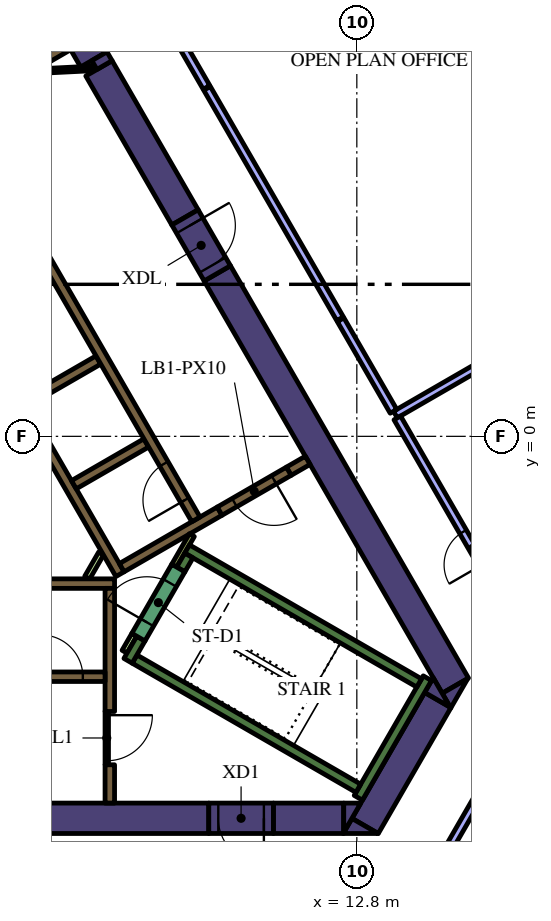
"""IFC4 building model, lengths in metres.
Left out: names, types, materials, properties, quantities, classifications, styles, units other than length and angle.
Written with IfcOpenShell. Run it as: python <this file> out.ifc"""

import sys

from ifc_helpers import new_model, si_unit, direction, frame, frame_2d, origin, place, context, subcontext, project, spatial, polyline, rectangle, outline, extrude, element, fill, save


model = new_model("IFC4")
c1 = context("Model", 3, precision=1e-05, world=origin(), true_north=direction((0.0, 1.0)))
c2 = subcontext(c1, "Body", "Model", "MODEL_VIEW")
j1 = project(units=[si_unit("LENGTHUNIT", "METRE"), si_unit("PLANEANGLEUNIT", "RADIAN")], contexts=[c1])
p1 = place(None, origin())
s1 = spatial("IfcSite", under=j1, at=p1, CompositionType="ELEMENT")
p2 = place(p1, origin())
s2 = spatial("IfcBuilding", under=s1, at=p2, CompositionType="ELEMENT")
p3 = place(p2, frame((0.0, 0.0, 183.6)))
s3 = spatial("IfcBuildingStorey", under=s2, at=p3, CompositionType="ELEMENT", Elevation=183.6)
p4 = place(p3, frame((9.129, 4.289, 0.0), z_axis=(0.0, 0.0, 1.0), x_axis=(0.499995742806, -0.866027861663, 0.0)))
e1 = element("IfcWall", 1, at=p4, inside=s3, PredefinedType="SOLIDWALL", context=c2, shape_type="SweptSolid", body=[
    extrude(rectangle(XDim=12.527, YDim=0.8, at=frame_2d((6.264, 0.0))), origin(), (0.0, 0.0, 1.0), 4.2),
])
p5 = place(p3, origin())
e2 = element("IfcWall", 2, at=p5, inside=s3, PredefinedType="SOLIDWALL", context=c2, shape_type="SweptSolid", body=[
    extrude(outline(polyline([(15.271, -7.15), (15.047, -6.762), (15.719, -6.374), (15.271, -7.15)])), origin(), (0.0, 0.0, 1.0), 4.2),
])
p6 = place(p3, frame((13.018, -10.252, 0.0), z_axis=(0.0, 0.0, 1.0), x_axis=(0.499984020225, 0.866034629516, 0.0)))
e3 = element("IfcWall", 3, at=p6, inside=s3, PredefinedType="SOLIDWALL", context=c2, shape_type="SweptSolid", body=[
    extrude(rectangle(XDim=3.824, YDim=0.8, at=frame_2d((1.912, 0.0))), origin(), (0.0, 0.0, 1.0), 4.2),
])
e4 = element("IfcWall", 4, at=p5, inside=s3, PredefinedType="SOLIDWALL", context=c2, shape_type="SweptSolid", body=[
    extrude(outline(polyline([(12.671, -10.053), (13.358, -10.45), (12.442, -10.45), (12.671, -10.053)])), origin(), (0.0, 0.0, 1.0), 4.2),
])
e5 = element("IfcWall", 5, at=p5, inside=s3, PredefinedType="SOLIDWALL", context=c2, shape_type="SweptSolid", body=[
    extrude(outline(polyline([(14.809, -6.35), (15.257, -7.126), (14.585, -6.738), (14.809, -6.35)])), origin(), (0.0, 0.0, 1.0), 4.2),
])
p7 = place(p3, frame((10.604, -10.05, 0.0), z_axis=(0.0, 0.0, 1.0), x_axis=(1.0, 0.0, 0.0)))
e6 = element("IfcWall", 6, at=p7, inside=s3, PredefinedType="SOLIDWALL", context=c2, shape_type="SweptSolid", body=[
    extrude(rectangle(XDim=1.849, YDim=0.8, at=frame_2d((0.925, 0.0))), origin(), (0.0, 0.0, 1.0), 4.2),
])
e7 = element("IfcWall", 7, at=p5, inside=s3, PredefinedType="SOLIDWALL", context=c2, shape_type="SweptSolid", body=[
    extrude(outline(polyline([(12.904, -9.65), (12.456, -10.426), (12.456, -9.65), (12.904, -9.65)])), origin(), (0.0, 0.0, 1.0), 4.2),
])
p8 = place(p3, frame((5.878, 9.918, 0.0), z_axis=(0.0, 0.0, 1.0), x_axis=(-0.499893918903, 0.866086641072, 0.0)))
e8 = element("IfcWall", 8, at=p8, inside=s3, PredefinedType="SOLIDWALL", context=c2, shape_type="SweptSolid", body=[
    extrude(rectangle(XDim=0.657, YDim=0.8, at=frame_2d((0.329, 0.0))), origin(), (0.0, 0.0, 1.0), 4.2),
])
p9 = place(p3, frame((8.279, 5.761, 0.0), z_axis=(0.0, 0.0, 1.0), x_axis=(-0.500024261398, 0.866011396007, 0.0)))
e9 = element("IfcWall", 9, at=p9, inside=s3, PredefinedType="SOLIDWALL", context=c2, shape_type="SweptSolid", body=[
    extrude(rectangle(XDim=4.528, YDim=0.8, at=frame_2d((2.264, 0.0))), origin(), (0.0, 0.0, 1.0), 4.2),
])
e10 = element("IfcWall", 10, at=p5, inside=s3, PredefinedType="SOLIDWALL", context=c2, shape_type="SweptSolid", body=[
    extrude(outline(polyline([(5.961, 9.654), (5.827, 9.886), (6.226, 10.116), (6.36, 9.884), (5.961, 9.654)])), origin(), (0.0, 0.0, 1.0), 4.2),
])
p10 = place(p3, frame((-13.378, -10.05, 0.0), z_axis=(0.0, 0.0, 1.0), x_axis=(1.0, 0.0, 0.0)))
e11 = element("IfcWall", 11, at=p10, inside=s3, PredefinedType="SOLIDWALL", context=c2, shape_type="SweptSolid", body=[
    extrude(rectangle(XDim=22.282, YDim=0.8, at=frame_2d((11.141, 0.0))), origin(), (0.0, 0.0, 1.0), 4.2),
])
p11 = place(p3, frame((12.84, -9.511, 0.0), z_axis=(0.0, 0.0, 1.0), x_axis=(0.499997733992, 0.866026712061, 0.0)))
e12 = element("IfcWall", 12, at=p11, inside=s3, PredefinedType="SOLIDWALL", context=c2, shape_type="SweptSolid", body=[
    extrude(rectangle(XDim=3.634, YDim=0.25, at=frame_2d((1.817, 0.0))), origin(), (0.0, 0.0, 1.0), 4.2),
])
p12 = place(p3, frame((12.84, -9.261, 0.0), z_axis=(0.0, 0.0, 1.0), x_axis=(-0.866013990052, 0.500019768644, 0.0)))
e13 = element("IfcWall", 13, at=p12, inside=s3, PredefinedType="SOLIDWALL", context=c2, shape_type="SweptSolid", body=[
    extrude(rectangle(XDim=6.8, YDim=0.25, at=frame_2d((3.4, 0.0))), origin(), (0.0, 0.0, 1.0), 4.2),
])
p13 = place(p3, frame((6.78, -5.906, 0.0), z_axis=(0.0, 0.0, 1.0), x_axis=(0.500223362819, 0.865896406789, 0.0)))
e14 = element("IfcWall", 14, at=p13, inside=s3, PredefinedType="SOLIDWALL", context=c2, shape_type="SweptSolid", body=[
    extrude(rectangle(XDim=0.675, YDim=0.25, at=frame_2d((0.337, 0.0))), origin(), (0.0, 0.0, 1.0), 4.2),
])
p14 = place(p3, frame((8.334, -2.964, 0.0), z_axis=(0.0, 0.0, 1.0), x_axis=(0.866016039709, -0.500016218704, 0.0)))
e15 = element("IfcWall", 15, at=p14, inside=s3, PredefinedType="SOLIDWALL", context=c2, shape_type="SweptSolid", body=[
    extrude(rectangle(XDim=7.05, YDim=0.25, at=frame_2d((3.525, 0.0))), origin(), (0.0, 0.0, 1.0), 4.2),
])
p15 = place(p3, frame((8.168, -3.503, 0.0), z_axis=(0.0, 0.0, 1.0), x_axis=(0.49972245349, 0.866185586049, 0.0)))
e16 = element("IfcWall", 16, at=p15, inside=s3, PredefinedType="SOLIDWALL", context=c2, shape_type="SweptSolid", body=[
    extrude(rectangle(XDim=0.425, YDim=0.25, at=frame_2d((0.212, 0.0))), origin(), (0.0, 0.0, 1.0), 4.2),
])
p16 = place(p3, frame((-5.545, -3.875, 0.0), z_axis=(0.0, 0.0, 1.0), x_axis=(1.0, 0.0, 0.0)))
e17 = element("IfcWall", 17, at=p16, inside=s3, PredefinedType="SOLIDWALL", context=c2, shape_type="SweptSolid", body=[
    extrude(rectangle(XDim=11.97, YDim=0.25, at=frame_2d((5.985, 0.0))), origin(), (0.0, 0.0, 1.0), 4.2),
])
p17 = place(p3, frame((6.3, -7.24, 0.0), z_axis=(0.0, 0.0, 1.0), x_axis=(0.0, 1.0, 0.0)))
e18 = element("IfcWall", 18, at=p17, inside=s3, PredefinedType="SOLIDWALL", context=c2, shape_type="SweptSolid", body=[
    extrude(rectangle(XDim=3.24, YDim=0.25, at=frame_2d((1.62, 0.0))), origin(), (0.0, 0.0, 1.0), 4.2),
])
p18 = place(p3, frame((6.3, -9.65, 0.0), z_axis=(0.0, 0.0, 1.0), x_axis=(0.0, 1.0, 0.0)))
e19 = element("IfcWall", 19, at=p18, inside=s3, PredefinedType="SOLIDWALL", context=c2, shape_type="SweptSolid", body=[
    extrude(rectangle(XDim=1.008, YDim=0.25, at=frame_2d((0.504, 0.0))), origin(), (0.0, 0.0, 1.0), 4.2),
])
p19 = place(p3, frame((11.507, -0.631, 0.0), z_axis=(0.0, 0.0, 1.0), x_axis=(-0.866093731455, -0.499881634324, 0.0)))
e20 = element("IfcWall", 20, at=p19, inside=s3, PredefinedType="SOLIDWALL", context=c2, shape_type="SweptSolid", body=[
    extrude(rectangle(XDim=0.575, YDim=0.25, at=frame_2d((0.288, 0.0))), origin(), (0.0, 0.0, 1.0), 4.2),
])
p20 = place(p3, frame((6.568, -3.627, 0.0), z_axis=(0.0, 0.0, 1.0), x_axis=(-0.499999455981, 0.866025717874, 0.0)))
e21 = element("IfcWall", 21, at=p20, inside=s3, PredefinedType="SOLIDWALL", context=c2, shape_type="SweptSolid", body=[
    extrude(rectangle(XDim=11.978, YDim=0.25, at=frame_2d((5.989, 0.0))), origin(), (0.0, 0.0, 1.0), 4.2),
])
for number, where, z_axis, x_axis in (
    (22, (2.834, 3.091, 0.0), (0.0, 0.0, 1.0), (0.866, 0.5, 0.0)),
    (23, (4.094, 0.909, 0.0), (0.0, 0.0, 1.0), (0.866, 0.5, 0.0)),
    (24, (5.354, -1.274, 0.0), (0.0, 0.0, 1.0), (0.866, 0.5, 0.0)),
):
    element("IfcWall", number, at=place(p3, frame(where, z_axis=z_axis, x_axis=x_axis)), inside=s3, PredefinedType="SOLIDWALL", context=c2, shape_type="SweptSolid", body=[
        extrude(rectangle(XDim=2.2, YDim=0.25, at=frame_2d((1.1, 0.0))), origin(), (0.0, 0.0, 1.0), 4.2),
    ])
p21 = place(p3, frame((6.614, -3.456, 0.0), z_axis=(0.0, 0.0, 1.0), x_axis=(0.866032512851, 0.499987686533, 0.0)))
e25 = element("IfcWall", 25, at=p21, inside=s3, PredefinedType="SOLIDWALL", context=c2, shape_type="SweptSolid", body=[
    extrude(rectangle(XDim=2.975, YDim=0.25, at=frame_2d((1.487, 0.0))), origin(), (0.0, 0.0, 1.0), 4.2),
])
p22 = place(p3, frame((4.689, 9.982, 0.0), z_axis=(0.0, 0.0, 1.0), x_axis=(0.865947592822, 0.500134748329, 0.0)))
e26 = element("IfcWall", 26, at=p22, inside=s3, PredefinedType="SOLIDWALL", context=c2, shape_type="SweptSolid", body=[
    extrude(rectangle(XDim=0.598, YDim=0.25, at=frame_2d((0.299, 0.0))), origin(), (0.0, 0.0, 1.0), 4.2),
])
p23 = place(p3, frame((6.945, -5.222, 0.0), z_axis=(0.0, 0.0, 1.0), x_axis=(-0.499818422106, -0.866130212453, 0.0)))
e27 = element("IfcWall", 27, at=p23, inside=s3, PredefinedType="PARTITIONING", context=c2, shape_type="SweptSolid", body=[
    extrude(rectangle(XDim=0.514, YDim=0.15, at=frame_2d((0.257, 0.0))), origin(), (0.0, 0.0, 1.0), 3.15),
])
p24 = place(p3, frame((8.459, -2.599, 0.0), z_axis=(0.0, 0.0, 1.0), x_axis=(-0.500041054325, -0.866001699761, 0.0)))
e28 = element("IfcWall", 28, at=p24, inside=s3, PredefinedType="PARTITIONING", context=c2, shape_type="SweptSolid", body=[
    extrude(rectangle(XDim=0.929, YDim=0.15, at=frame_2d((0.464, 0.0))), origin(), (0.0, 0.0, 1.0), 4.2),
])
p25 = place(p3, frame((5.705, -3.718, 0.0), z_axis=(0.0, 0.0, 1.0), x_axis=(0.499962090823, 0.866047289552, 0.0)))
e29 = element("IfcWall", 29, at=p25, inside=s3, PredefinedType="PARTITIONING", context=c2, shape_type="SweptSolid", body=[
    extrude(rectangle(XDim=0.735, YDim=0.15, at=frame_2d((0.367, 0.0))), origin(), (0.0, 0.0, 1.0), 3.15),
])
p26 = place(p3, frame((-6.175, -6.325, 0.0), z_axis=(0.0, 0.0, 1.0), x_axis=(1.0, 0.0, 0.0)))
e30 = element("IfcWall", 30, at=p26, inside=s3, PredefinedType="SOLIDWALL", context=c2, shape_type="SweptSolid", body=[
    extrude(rectangle(XDim=12.35, YDim=0.25, at=frame_2d((6.175, 0.0))), origin(), (0.0, 0.0, 1.0), 4.2),
])
p27 = place(p26, frame((0.585, 0.0, 0.0)))
e31 = element("IfcOpeningElement", 31, at=p27, cuts=e30, PredefinedType="OPENING", context=c2, shape_type="SweptSolid", body=[
    extrude(rectangle(XDim=1.1, YDim=2.1, at=frame_2d((0.55, 1.05))), frame((0.0, 0.135, 0.0), z_axis=(0.0, -1.0, 0.0), x_axis=(1.0, 0.0, 0.0)), (0.0, 0.0, 1.0), 0.27),
])
p28 = place(p26, frame((3.105, 0.0, 0.0)))
e32 = element("IfcOpeningElement", 32, at=p28, cuts=e30, PredefinedType="OPENING", context=c2, shape_type="SweptSolid", body=[
    extrude(rectangle(XDim=1.1, YDim=2.1, at=frame_2d((0.55, 1.05))), frame((0.0, 0.135, 0.0), z_axis=(0.0, -1.0, 0.0), x_axis=(1.0, 0.0, 0.0)), (0.0, 0.0, 1.0), 0.27),
])
p29 = place(p26, frame((5.625, 0.0, 0.0)))
e33 = element("IfcOpeningElement", 33, at=p29, cuts=e30, PredefinedType="OPENING", context=c2, shape_type="SweptSolid", body=[
    extrude(rectangle(XDim=1.1, YDim=2.1, at=frame_2d((0.55, 1.05))), frame((0.0, 0.135, 0.0), z_axis=(0.0, -1.0, 0.0), x_axis=(1.0, 0.0, 0.0)), (0.0, 0.0, 1.0), 0.27),
])
p30 = place(p26, frame((8.145, 0.0, 0.0)))
e34 = element("IfcOpeningElement", 34, at=p30, cuts=e30, PredefinedType="OPENING", context=c2, shape_type="SweptSolid", body=[
    extrude(rectangle(XDim=1.1, YDim=2.1, at=frame_2d((0.55, 1.05))), frame((0.0, 0.135, 0.0), z_axis=(0.0, -1.0, 0.0), x_axis=(1.0, 0.0, 0.0)), (0.0, 0.0, 1.0), 0.27),
])
p31 = place(p26, frame((10.665, 0.0, 0.0)))
e35 = element("IfcOpeningElement", 35, at=p31, cuts=e30, PredefinedType="OPENING", context=c2, shape_type="SweptSolid", body=[
    extrude(rectangle(XDim=1.1, YDim=2.1, at=frame_2d((0.55, 1.05))), frame((0.0, 0.135, 0.0), z_axis=(0.0, -1.0, 0.0), x_axis=(1.0, 0.0, 0.0)), (0.0, 0.0, 1.0), 0.27),
])
p32 = place(p3, frame((8.565, -2.185, 0.0), z_axis=(0.0, 0.0, 1.0), x_axis=(-0.499997954832, 0.866026584559, 0.0)))
e36 = element("IfcWall", 36, at=p32, inside=s3, PredefinedType="SOLIDWALL", context=c2, shape_type="SweptSolid", body=[
    extrude(rectangle(XDim=12.35, YDim=0.25, at=frame_2d((6.175, 0.0))), origin(), (0.0, 0.0, 1.0), 4.2),
])
p33 = place(p32, frame((0.585, 0.0, 0.0)))
e37 = element("IfcOpeningElement", 37, at=p33, cuts=e36, PredefinedType="OPENING", context=c2, shape_type="SweptSolid", body=[
    extrude(rectangle(XDim=1.1, YDim=2.1, at=frame_2d((0.55, 1.05))), frame((0.0, 0.135, 0.0), z_axis=(0.0, -1.0, 0.0), x_axis=(1.0, 0.0, 0.0)), (0.0, 0.0, 1.0), 0.27),
])
p34 = place(p3, frame((7.053, -5.284, 0.0), z_axis=(0.0, 0.0, 1.0), x_axis=(0.500078061341, 0.865980330357, 0.0)))
e38 = element("IfcWall", 38, at=p34, inside=s3, PredefinedType="SOLIDWALL", context=c2, shape_type="SweptSolid", body=[
    extrude(rectangle(XDim=2.1, YDim=0.4, at=frame_2d((1.05, 0.0))), origin(), (0.0, 0.0, 1.0), 4.2),
])
p35 = place(p34, frame((0.45, 0.0, 0.0)))
e39 = element("IfcOpeningElement", 39, at=p35, cuts=e38, PredefinedType="OPENING", context=c2, shape_type="SweptSolid", body=[
    extrude(rectangle(XDim=1.2, YDim=2.1, at=frame_2d((0.6, 1.05))), frame((0.0, 0.21, 0.0), z_axis=(0.0, -1.0, 0.0), x_axis=(1.0, 0.0, 0.0)), (0.0, 0.0, 1.0), 0.42),
])
p36 = place(p3, frame((5.917, 9.684, 0.0), z_axis=(0.0, 0.0, 1.0), x_axis=(-0.998758194515, -0.049820366212, 0.0)))
e40 = element("IfcWall", 40, at=p36, inside=s3, PredefinedType="PARTITIONING", context=c2, shape_type="SweptSolid", body=[
    extrude(rectangle(XDim=2.7, YDim=0.12, at=frame_2d((1.35, 0.0))), origin(), (0.0, 0.0, 1.0), 3.15),
])
p37 = place(p36, frame((1.45, 0.0, 0.0)))
e41 = element("IfcOpeningElement", 41, at=p37, cuts=e40, PredefinedType="OPENING", context=c2, shape_type="SweptSolid", body=[
    extrude(rectangle(XDim=0.9, YDim=2.1, at=frame_2d((0.45, 1.05))), frame((0.0, 0.07, 0.0), z_axis=(0.0, -1.0, 0.0), x_axis=(1.0, 0.0, 0.0)), (0.0, 0.0, 1.0), 0.14),
])
p38 = place(p3, frame((6.22, -7.237, 0.0), z_axis=(0.0, 0.0, 1.0), x_axis=(0.0, -1.0, 0.0)))
e42 = element("IfcWall", 42, at=p38, inside=s3, PredefinedType="PARTITIONING", context=c2, shape_type="SweptSolid", body=[
    extrude(rectangle(XDim=1.4, YDim=0.09, at=frame_2d((0.7, 0.0))), origin(), (0.0, 0.0, 1.0), 3.15),
])
p39 = place(p38, frame((0.1, 0.0, 0.0)))
e43 = element("IfcOpeningElement", 43, at=p39, cuts=e42, PredefinedType="OPENING", context=c2, shape_type="SweptSolid", body=[
    extrude(rectangle(XDim=1.2, YDim=2.1, at=frame_2d((0.6, 1.05))), frame((0.0, 0.055, 0.0), z_axis=(0.0, -1.0, 0.0), x_axis=(1.0, 0.0, 0.0)), (0.0, 0.0, 1.0), 0.11),
])
p40 = place(p3, frame((11.009, -0.919, 0.0), z_axis=(0.0, 0.0, 1.0), x_axis=(-0.866059744384, -0.49994051562, 0.0)))
e44 = element("IfcWall", 44, at=p40, inside=s3, PredefinedType="SOLIDWALL", context=c2, shape_type="SweptSolid", body=[
    extrude(rectangle(XDim=2.1, YDim=0.25, at=frame_2d((1.05, 0.0))), origin(), (0.0, 0.0, 1.0), 4.2),
])
p41 = place(p40, frame((0.45, 0.0, 0.0)))
e45 = element("IfcOpeningElement", 45, at=p41, cuts=e44, PredefinedType="OPENING", context=c2, shape_type="SweptSolid", body=[
    extrude(rectangle(XDim=1.2, YDim=2.1, at=frame_2d((0.6, 1.05))), frame((0.0, 0.135, 0.0), z_axis=(0.0, -1.0, 0.0), x_axis=(1.0, 0.0, 0.0)), (0.0, 0.0, 1.0), 0.27),
])
p42 = place(p3, frame((10.604, -10.05, 0.0), z_axis=(0.0, 0.0, 1.0), x_axis=(-1.0, 0.0, 0.0)))
e46 = element("IfcWall", 46, at=p42, inside=s3, PredefinedType="SOLIDWALL", context=c2, shape_type="SweptSolid", body=[
    extrude(rectangle(XDim=1.7, YDim=0.8, at=frame_2d((0.85, 0.0))), origin(), (0.0, 0.0, 1.0), 4.2),
])
p43 = place(p42, frame((0.25, 0.0, 0.0)))
e47 = element("IfcOpeningElement", 47, at=p43, cuts=e46, PredefinedType="OPENING", context=c2, shape_type="SweptSolid", body=[
    extrude(rectangle(XDim=1.2, YDim=2.1, at=frame_2d((0.6, 1.05))), frame((0.0, 0.41, 0.0), z_axis=(0.0, -1.0, 0.0), x_axis=(1.0, 0.0, 0.0)), (0.0, 0.0, 1.0), 0.82),
])
p44 = place(p3, frame((8.279, 5.761, 0.0), z_axis=(0.0, 0.0, 1.0), x_axis=(0.500062241894, -0.865989465428, 0.0)))
e48 = element("IfcWall", 48, at=p44, inside=s3, PredefinedType="SOLIDWALL", context=c2, shape_type="SweptSolid", body=[
    extrude(rectangle(XDim=1.7, YDim=0.8, at=frame_2d((0.85, 0.0))), origin(), (0.0, 0.0, 1.0), 4.2),
])
p45 = place(p44, frame((0.25, 0.0, 0.0)))
e49 = element("IfcOpeningElement", 49, at=p45, cuts=e48, PredefinedType="OPENING", context=c2, shape_type="SweptSolid", body=[
    extrude(rectangle(XDim=1.2, YDim=2.1, at=frame_2d((0.6, 1.05))), frame((0.0, 0.41, 0.0), z_axis=(0.0, -1.0, 0.0), x_axis=(1.0, 0.0, 0.0)), (0.0, 0.0, 1.0), 0.82),
])
p46 = place(p3, frame((14.42, -12.224, 0.0), z_axis=(0.0, 0.0, 1.0), x_axis=(0.500001965626, 0.866024268927, 0.0)))
e50 = element("IfcWall", 50, at=p46, inside=s3, PredefinedType="PARTITIONING", context=c2, shape_type="SweptSolid", body=[
    extrude(rectangle(XDim=3.276, YDim=0.2, at=frame_2d((1.638, 0.0))), origin(), (0.0, 0.0, 1.0), 3.15),
])
p47 = place(p3, frame((13.815, 0.572, 0.0), z_axis=(0.0, 0.0, 1.0), x_axis=(0.866036391575, 0.499980968105, 0.0)))
e51 = element("IfcWall", 51, at=p47, inside=s3, PredefinedType="PARTITIONING", context=c2, shape_type="SweptSolid", body=[
    extrude(rectangle(XDim=8.42, YDim=0.2, at=frame_2d((4.21, 0.0))), origin(), (0.0, 0.0, 1.0), 3.15),
])
p48 = place(p3, frame((17.796, -6.324, 0.0), z_axis=(0.0, 0.0, 1.0), x_axis=(-0.500026166427, 0.866010296064, 0.0)))
e52 = element("IfcWall", 52, at=p48, inside=s3, PredefinedType="PARTITIONING", context=c2, shape_type="SweptSolid", body=[
    extrude(rectangle(XDim=7.863, YDim=0.2, at=frame_2d((3.931, 0.0))), origin(), (0.0, 0.0, 1.0), 3.15),
])
p49 = place(p48, frame((3.4, 0.0, 0.0)))
e53 = element("IfcOpeningElement", 53, at=p49, cuts=e52, PredefinedType="OPENING", context=c2, shape_type="SweptSolid", body=[
    extrude(rectangle(XDim=1.0, YDim=2.1, at=frame_2d((0.5, 1.05))), frame((0.0, 0.11, 0.0), z_axis=(0.0, -1.0, 0.0), x_axis=(1.0, 0.0, 0.0)), (0.0, 0.0, 1.0), 0.22),
])
p50 = place(p3, frame((12.359, 3.094, 0.0), z_axis=(0.0, 0.0, 1.0), x_axis=(-0.500010275428, 0.866019471182, 0.0)))
e54 = element("IfcWall", 54, at=p50, inside=s3, PredefinedType="PARTITIONING", context=c2, shape_type="SweptSolid", body=[
    extrude(rectangle(XDim=7.0, YDim=0.2, at=frame_2d((3.5, 0.0))), origin(), (0.0, 0.0, 1.0), 3.15),
])
p51 = place(p3, frame((8.844, 9.182, 0.0), z_axis=(0.0, 0.0, 1.0), x_axis=(-0.50000000053, 0.866025403479, 0.0)))
e55 = element("IfcWall", 55, at=p51, inside=s3, PredefinedType="PARTITIONING", context=c2, shape_type="SweptSolid", body=[
    extrude(rectangle(XDim=9.188, YDim=0.2, at=frame_2d((4.594, 0.0))), origin(), (0.0, 0.0, 1.0), 3.15),
])
p52 = place(p51, frame((4.1, 0.0, 0.0)))
e56 = element("IfcOpeningElement", 56, at=p52, cuts=e55, PredefinedType="OPENING", context=c2, shape_type="SweptSolid", body=[
    extrude(rectangle(XDim=1.0, YDim=2.1, at=frame_2d((0.5, 1.05))), frame((0.0, 0.11, 0.0), z_axis=(0.0, -1.0, 0.0), x_axis=(1.0, 0.0, 0.0)), (0.0, 0.0, 1.0), 0.22),
])
p53 = place(p3, frame((13.765, 0.659, 0.0), z_axis=(0.0, 0.0, 1.0), x_axis=(-0.500046568876, 0.865998515562, 0.0)))
e57 = element("IfcWall", 57, at=p53, inside=s3, PredefinedType="PARTITIONING", context=c2, shape_type="SweptSolid", body=[
    extrude(rectangle(XDim=2.782, YDim=0.2, at=frame_2d((1.391, 0.0))), origin(), (0.0, 0.0, 1.0), 3.15),
])
p54 = place(p31, origin())
e58 = element("IfcDoor", 58, at=p54, inside=s3, OperationType="DOUBLE_DOOR_SLIDING", PredefinedType="DOOR", context=c2, shape_type="SweptSolid", body=[
    extrude(rectangle(XDim=1.1, YDim=2.1, at=frame_2d((0.55, 1.05))), frame((0.0, 0.025, 0.0), z_axis=(0.0, -1.0, 0.0), x_axis=(1.0, 0.0, 0.0)), (0.0, 0.0, 1.0), 0.05),
])
fill(e35, e58)
p55 = place(p33, origin())
e59 = element("IfcDoor", 59, at=p55, inside=s3, OperationType="DOUBLE_DOOR_SLIDING", PredefinedType="DOOR", context=c2, shape_type="SweptSolid", body=[
    extrude(rectangle(XDim=1.1, YDim=2.1, at=frame_2d((0.55, 1.05))), frame((0.0, 0.025, 0.0), z_axis=(0.0, -1.0, 0.0), x_axis=(1.0, 0.0, 0.0)), (0.0, 0.0, 1.0), 0.05),
])
fill(e37, e59)
p56 = place(p35, origin())
e60 = element("IfcDoor", 60, at=p56, inside=s3, OperationType="SINGLE_SWING_LEFT", PredefinedType="DOOR", context=c2, shape_type="SweptSolid", body=[
    extrude(rectangle(XDim=1.2, YDim=2.1, at=frame_2d((0.6, 1.05))), frame((0.0, 0.025, 0.0), z_axis=(0.0, -1.0, 0.0), x_axis=(1.0, 0.0, 0.0)), (0.0, 0.0, 1.0), 0.05),
])
fill(e39, e60)
p57 = place(p39, origin())
e61 = element("IfcDoor", 61, at=p57, inside=s3, OperationType="SINGLE_SWING_LEFT", PredefinedType="DOOR", context=c2, shape_type="SweptSolid", body=[
    extrude(rectangle(XDim=1.2, YDim=2.1, at=frame_2d((0.6, 1.05))), frame((0.0, 0.025, 0.0), z_axis=(0.0, -1.0, 0.0), x_axis=(1.0, 0.0, 0.0)), (0.0, 0.0, 1.0), 0.05),
])
fill(e43, e61)
p58 = place(p41, origin())
e62 = element("IfcDoor", 62, at=p58, inside=s3, OperationType="SINGLE_SWING_LEFT", PredefinedType="DOOR", context=c2, shape_type="SweptSolid", body=[
    extrude(rectangle(XDim=1.2, YDim=2.1, at=frame_2d((0.6, 1.05))), frame((0.0, 0.025, 0.0), z_axis=(0.0, -1.0, 0.0), x_axis=(1.0, 0.0, 0.0)), (0.0, 0.0, 1.0), 0.05),
])
fill(e45, e62)
p59 = place(p43, origin())
e63 = element("IfcDoor", 63, at=p59, inside=s3, OperationType="SINGLE_SWING_LEFT", PredefinedType="DOOR", context=c2, shape_type="SweptSolid", body=[
    extrude(rectangle(XDim=1.2, YDim=2.1, at=frame_2d((0.6, 1.05))), frame((0.0, 0.025, 0.0), z_axis=(0.0, -1.0, 0.0), x_axis=(1.0, 0.0, 0.0)), (0.0, 0.0, 1.0), 0.05),
])
fill(e47, e63)
p60 = place(p45, origin())
e64 = element("IfcDoor", 64, at=p60, inside=s3, OperationType="SINGLE_SWING_LEFT", PredefinedType="DOOR", context=c2, shape_type="SweptSolid", body=[
    extrude(rectangle(XDim=1.2, YDim=2.1, at=frame_2d((0.6, 1.05))), frame((0.0, 0.025, 0.0), z_axis=(0.0, -1.0, 0.0), x_axis=(1.0, 0.0, 0.0)), (0.0, 0.0, 1.0), 0.05),
])
fill(e49, e64)
p61 = place(p49, origin())
e65 = element("IfcDoor", 65, at=p61, inside=s3, OperationType="SINGLE_SWING_LEFT", PredefinedType="DOOR", context=c2, shape_type="SweptSolid", body=[
    extrude(rectangle(XDim=1.0, YDim=2.1, at=frame_2d((0.5, 1.05))), frame((0.0, 0.025, 0.0), z_axis=(0.0, -1.0, 0.0), x_axis=(1.0, 0.0, 0.0)), (0.0, 0.0, 1.0), 0.05),
])
fill(e53, e65)
save(model, sys.argv[1])
